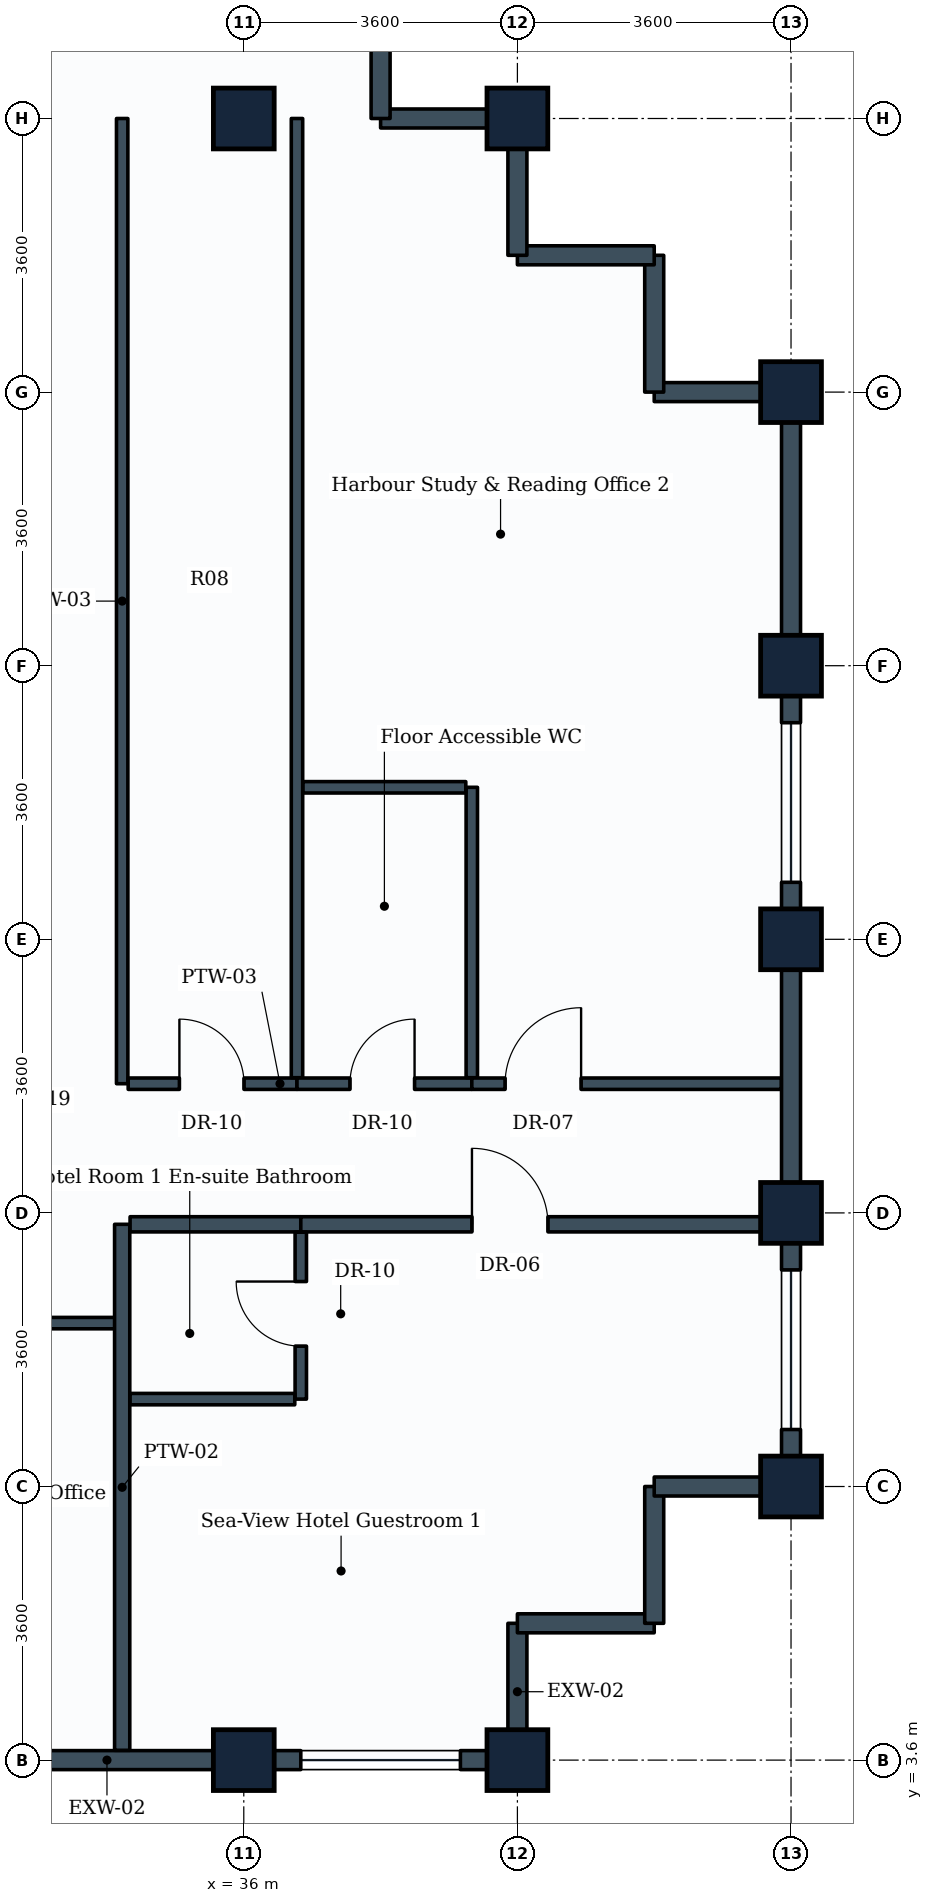
"""IFC4 building model, lengths in metres.
Left out: names, types, materials, properties, quantities, classifications, styles, units other than length and angle.
Written with IfcOpenShell. Run it as: python <this file> out.ifc"""

import sys

from ifc_helpers import new_model, si_unit, direction, frame, frame_2d, origin, origin_2d, place, context, subcontext, project, spatial, rectangle, extrude, element, fill, save


model = new_model("IFC4")
c1 = context("Model", 3, precision=1e-05, world=origin(), true_north=direction((0.0, 1.0)))
c2 = subcontext(c1, "Body", "Model", "MODEL_VIEW")
j1 = project(units=[si_unit("LENGTHUNIT", "METRE"), si_unit("PLANEANGLEUNIT", "RADIAN")], contexts=[c1])
p1 = place(None, origin())
s1 = spatial("IfcSite", under=j1, at=p1, CompositionType="ELEMENT")
p2 = place(p1, origin())
s2 = spatial("IfcBuilding", under=s1, at=p2, CompositionType="ELEMENT")
p3 = place(p2, frame((0.0, 0.0, 284.6)))
s3 = spatial("IfcBuildingStorey", under=s2, at=p3, CompositionType="ELEMENT", Elevation=284.6)
for number, where, z_axis, x_axis in (
    (1, (36.0, 3.6, 0.0), (0.0, 0.0, 1.0), (1.0, 0.0, 0.0)),
    (2, (36.0, 25.2, 0.0), (0.0, 0.0, 1.0), (1.0, 0.0, 0.0)),
    (3, (39.6, 3.6, 0.0), (0.0, 0.0, 1.0), (1.0, 0.0, 0.0)),
    (4, (39.6, 25.2, 0.0), (0.0, 0.0, 1.0), (1.0, 0.0, 0.0)),
    (5, (43.2, 7.2, 0.0), (0.0, 0.0, 1.0), (1.0, 0.0, 0.0)),
    (6, (43.2, 10.8, 0.0), (0.0, 0.0, 1.0), (0.0, 1.0, 0.0)),
    (7, (43.2, 14.4, 0.0), (0.0, 0.0, 1.0), (0.0, 1.0, 0.0)),
    (8, (43.2, 18.0, 0.0), (0.0, 0.0, 1.0), (0.0, 1.0, 0.0)),
    (9, (43.2, 21.6, 0.0), (0.0, 0.0, 1.0), (0.0, 1.0, 0.0)),
):
    element("IfcColumn", number, at=place(p3, frame(where, z_axis=z_axis, x_axis=x_axis)), inside=s3, PredefinedType="COLUMN", context=c2, shape_type="SweptSolid", body=[
        extrude(rectangle(XDim=0.8, YDim=0.8, at=origin_2d()), origin(), (0.0, 0.0, 1.0), 3.6),
    ])
p4 = place(p3, frame((36.0, 3.6, 0.0), z_axis=(0.0, 0.0, 1.0), x_axis=(-1.0, 0.0, 0.0)))
e10 = element("IfcWall", 10, at=p4, inside=s3, PredefinedType="STANDARD", context=c2, shape_type="SweptSolid", body=[
    extrude(rectangle(XDim=3.6, YDim=0.25, at=frame_2d((1.8, 0.0))), origin(), (0.0, 0.0, 1.0), 2.83),
])
p5 = place(p3, frame((39.6, 3.6, 0.0), z_axis=(0.0, 0.0, 1.0), x_axis=(-1.0, 0.0, 0.0)))
e11 = element("IfcWall", 11, at=p5, inside=s3, PredefinedType="STANDARD", context=c2, shape_type="SweptSolid", body=[
    extrude(rectangle(XDim=3.6, YDim=0.25, at=frame_2d((1.8, 0.0))), origin(), (0.0, 0.0, 1.0), 2.83),
])
p6 = place(p5, frame((0.75, 0.0, 0.85)))
e12 = element("IfcOpeningElement", 12, at=p6, cuts=e11, PredefinedType="OPENING", context=c2, shape_type="SweptSolid", body=[
    extrude(rectangle(XDim=2.1, YDim=1.35, at=frame_2d((1.05, 0.675))), frame((0.0, 0.135, 0.0), z_axis=(0.0, -1.0, 0.0), x_axis=(1.0, 0.0, 0.0)), (0.0, 0.0, 1.0), 0.27),
])
p7 = place(p3, frame((39.6, 5.4, 0.0), z_axis=(0.0, 0.0, 1.0), x_axis=(0.0, -1.0, 0.0)))
e13 = element("IfcWall", 13, at=p7, inside=s3, PredefinedType="STANDARD", context=c2, shape_type="SweptSolid", body=[
    extrude(rectangle(XDim=1.8, YDim=0.25, at=frame_2d((0.9, 0.0))), origin(), (0.0, 0.0, 1.0), 2.83),
])
p8 = place(p3, frame((41.4, 5.4, 0.0), z_axis=(0.0, 0.0, 1.0), x_axis=(-1.0, 0.0, 0.0)))
e14 = element("IfcWall", 14, at=p8, inside=s3, PredefinedType="STANDARD", context=c2, shape_type="SweptSolid", body=[
    extrude(rectangle(XDim=1.8, YDim=0.25, at=frame_2d((0.9, 0.0))), origin(), (0.0, 0.0, 1.0), 3.335),
])
p9 = place(p3, frame((41.4, 7.2, 0.0), z_axis=(0.0, 0.0, 1.0), x_axis=(0.0, -1.0, 0.0)))
e15 = element("IfcWall", 15, at=p9, inside=s3, PredefinedType="STANDARD", context=c2, shape_type="SweptSolid", body=[
    extrude(rectangle(XDim=1.8, YDim=0.25, at=frame_2d((0.9, 0.0))), origin(), (0.0, 0.0, 1.0), 3.335),
])
p10 = place(p3, frame((43.2, 7.2, 0.0), z_axis=(0.0, 0.0, 1.0), x_axis=(-1.0, 0.0, 0.0)))
e16 = element("IfcWall", 16, at=p10, inside=s3, PredefinedType="STANDARD", context=c2, shape_type="SweptSolid", body=[
    extrude(rectangle(XDim=1.8, YDim=0.25, at=frame_2d((0.9, 0.0))), origin(), (0.0, 0.0, 1.0), 2.83),
])
p11 = place(p3, frame((43.2, 10.8, 0.0), z_axis=(0.0, 0.0, 1.0), x_axis=(0.0, -1.0, 0.0)))
e17 = element("IfcWall", 17, at=p11, inside=s3, PredefinedType="STANDARD", context=c2, shape_type="SweptSolid", body=[
    extrude(rectangle(XDim=3.6, YDim=0.25, at=frame_2d((1.8, 0.0))), origin(), (0.0, 0.0, 1.0), 2.83),
])
p12 = place(p11, frame((0.75, 0.0, 0.85)))
e18 = element("IfcOpeningElement", 18, at=p12, cuts=e17, PredefinedType="OPENING", context=c2, shape_type="SweptSolid", body=[
    extrude(rectangle(XDim=2.1, YDim=1.35, at=frame_2d((1.05, 0.675))), frame((0.0, 0.135, 0.0), z_axis=(0.0, -1.0, 0.0), x_axis=(1.0, 0.0, 0.0)), (0.0, 0.0, 1.0), 0.27),
])
p13 = place(p3, frame((43.2, 14.4, 0.0), z_axis=(0.0, 0.0, 1.0), x_axis=(0.0, -1.0, 0.0)))
e19 = element("IfcWall", 19, at=p13, inside=s3, PredefinedType="STANDARD", context=c2, shape_type="SweptSolid", body=[
    extrude(rectangle(XDim=3.6, YDim=0.25, at=frame_2d((1.8, 0.0))), origin(), (0.0, 0.0, 1.0), 2.83),
])
p14 = place(p3, frame((43.2, 18.0, 0.0), z_axis=(0.0, 0.0, 1.0), x_axis=(0.0, -1.0, 0.0)))
e20 = element("IfcWall", 20, at=p14, inside=s3, PredefinedType="STANDARD", context=c2, shape_type="SweptSolid", body=[
    extrude(rectangle(XDim=3.6, YDim=0.25, at=frame_2d((1.8, 0.0))), origin(), (0.0, 0.0, 1.0), 2.83),
])
p15 = place(p14, frame((0.75, 0.0, 0.85)))
e21 = element("IfcOpeningElement", 21, at=p15, cuts=e20, PredefinedType="OPENING", context=c2, shape_type="SweptSolid", body=[
    extrude(rectangle(XDim=2.1, YDim=1.35, at=frame_2d((1.05, 0.675))), frame((0.0, 0.135, 0.0), z_axis=(0.0, -1.0, 0.0), x_axis=(1.0, 0.0, 0.0)), (0.0, 0.0, 1.0), 0.27),
])
p16 = place(p3, frame((43.2, 21.6, 0.0), z_axis=(0.0, 0.0, 1.0), x_axis=(0.0, -1.0, 0.0)))
e22 = element("IfcWall", 22, at=p16, inside=s3, PredefinedType="STANDARD", context=c2, shape_type="SweptSolid", body=[
    extrude(rectangle(XDim=3.6, YDim=0.25, at=frame_2d((1.8, 0.0))), origin(), (0.0, 0.0, 1.0), 2.83),
])
p17 = place(p3, frame((41.4, 21.6, 0.0), z_axis=(0.0, 0.0, 1.0), x_axis=(1.0, 0.0, 0.0)))
e23 = element("IfcWall", 23, at=p17, inside=s3, PredefinedType="STANDARD", context=c2, shape_type="SweptSolid", body=[
    extrude(rectangle(XDim=1.8, YDim=0.25, at=frame_2d((0.9, 0.0))), origin(), (0.0, 0.0, 1.0), 2.83),
])
for number, where, z_axis, x_axis in (
    (24, (41.4, 23.4, 0.0), (0.0, 0.0, 1.0), (0.0, -1.0, 0.0)),
    (25, (39.6, 23.4, 0.0), (0.0, 0.0, 1.0), (1.0, 0.0, 0.0)),
):
    element("IfcWall", number, at=place(p3, frame(where, z_axis=z_axis, x_axis=x_axis)), inside=s3, PredefinedType="STANDARD", context=c2, shape_type="SweptSolid", body=[
        extrude(rectangle(XDim=1.8, YDim=0.25, at=frame_2d((0.9, 0.0))), origin(), (0.0, 0.0, 1.0), 3.335),
    ])
for number, where, z_axis, x_axis in (
    (26, (39.6, 25.2, 0.0), (0.0, 0.0, 1.0), (0.0, -1.0, 0.0)),
    (27, (37.8, 25.2, 0.0), (0.0, 0.0, 1.0), (1.0, 0.0, 0.0)),
):
    element("IfcWall", number, at=place(p3, frame(where, z_axis=z_axis, x_axis=x_axis)), inside=s3, PredefinedType="STANDARD", context=c2, shape_type="SweptSolid", body=[
        extrude(rectangle(XDim=1.8, YDim=0.25, at=frame_2d((0.9, 0.0))), origin(), (0.0, 0.0, 1.0), 2.83),
    ])
p18 = place(p3, frame((37.8, 27.3, 0.0), z_axis=(0.0, 0.0, 1.0), x_axis=(0.0, -1.0, 0.0)))
e28 = element("IfcWall", 28, at=p18, inside=s3, PredefinedType="STANDARD", context=c2, shape_type="SweptSolid", body=[
    extrude(rectangle(XDim=2.1, YDim=0.25, at=frame_2d((1.05, 0.0))), origin(), (0.0, 0.0, 1.0), 2.83),
])
p19 = place(p3, frame((34.4, 12.5, 0.0), z_axis=(0.0, 0.0, 1.0), x_axis=(0.0, 1.0, 0.0)))
e29 = element("IfcWall", 29, at=p19, inside=s3, PredefinedType="PARTITIONING", context=c2, shape_type="SweptSolid", body=[
    extrude(rectangle(XDim=12.7, YDim=0.15, at=frame_2d((6.35, 0.0))), origin(), (0.0, 0.0, 1.0), 2.83),
])
p20 = place(p3, frame((34.479, 12.5, 0.0), z_axis=(0.0, 0.0, 1.0), x_axis=(1.0, 0.0, 0.0)))
e30 = element("IfcWall", 30, at=p20, inside=s3, PredefinedType="PARTITIONING", context=c2, shape_type="SweptSolid", body=[
    extrude(rectangle(XDim=2.221, YDim=0.15, at=frame_2d((1.11, 0.0))), origin(), (0.0, 0.0, 1.0), 3.02),
])
p21 = place(p20, frame((0.674, 0.0, 0.0)))
e31 = element("IfcOpeningElement", 31, at=p21, cuts=e30, PredefinedType="OPENING", context=c2, shape_type="SweptSolid", body=[
    extrude(rectangle(XDim=0.85, YDim=2.1, at=frame_2d((0.425, 1.05))), frame((0.0, 0.085, 0.0), z_axis=(0.0, -1.0, 0.0), x_axis=(1.0, 0.0, 0.0)), (0.0, 0.0, 1.0), 0.17),
])
p22 = place(p3, frame((36.7, 12.579, 0.0), z_axis=(0.0, 0.0, 1.0), x_axis=(0.0, 1.0, 0.0)))
e32 = element("IfcWall", 32, at=p22, inside=s3, PredefinedType="PARTITIONING", context=c2, shape_type="SweptSolid", body=[
    extrude(rectangle(XDim=12.621, YDim=0.15, at=frame_2d((6.311, 0.0))), origin(), (0.0, 0.0, 1.0), 2.83),
])
p23 = place(p3, frame((36.7, 12.5, 0.0), z_axis=(0.0, 0.0, 1.0), x_axis=(1.0, 0.0, 0.0)))
e33 = element("IfcWall", 33, at=p23, inside=s3, PredefinedType="PARTITIONING", context=c2, shape_type="SweptSolid", body=[
    extrude(rectangle(XDim=2.3, YDim=0.15, at=frame_2d((1.15, 0.0))), origin(), (0.0, 0.0, 1.0), 3.335),
])
p24 = place(p23, frame((0.697, 0.0, 0.0)))
e34 = element("IfcOpeningElement", 34, at=p24, cuts=e33, PredefinedType="OPENING", context=c2, shape_type="SweptSolid", body=[
    extrude(rectangle(XDim=0.85, YDim=2.1, at=frame_2d((0.425, 1.05))), frame((0.0, 0.085, 0.0), z_axis=(0.0, -1.0, 0.0), x_axis=(1.0, 0.0, 0.0)), (0.0, 0.0, 1.0), 0.17),
])
p25 = place(p3, frame((39.0, 12.579, 0.0), z_axis=(0.0, 0.0, 1.0), x_axis=(0.0, 1.0, 0.0)))
e35 = element("IfcWall", 35, at=p25, inside=s3, PredefinedType="PARTITIONING", context=c2, shape_type="SweptSolid", body=[
    extrude(rectangle(XDim=3.821, YDim=0.15, at=frame_2d((1.91, 0.0))), origin(), (0.0, 0.0, 1.0), 3.03),
])
p26 = place(p3, frame((36.779, 16.4, 0.0), z_axis=(0.0, 0.0, 1.0), x_axis=(1.0, 0.0, 0.0)))
e36 = element("IfcWall", 36, at=p26, inside=s3, PredefinedType="PARTITIONING", context=c2, shape_type="SweptSolid", body=[
    extrude(rectangle(XDim=2.142, YDim=0.15, at=frame_2d((1.071, 0.0))), origin(), (0.0, 0.0, 1.0), 3.335),
])
p27 = place(p3, frame((28.879, 9.35, 0.0), z_axis=(0.0, 0.0, 1.0), x_axis=(1.0, 0.0, 0.0)))
e37 = element("IfcWall", 37, at=p27, inside=s3, PredefinedType="PARTITIONING", context=c2, shape_type="SweptSolid", body=[
    extrude(rectangle(XDim=5.521, YDim=0.15, at=frame_2d((2.76, 0.0))), origin(), (0.0, 0.0, 1.0), 3.335),
])
p28 = place(p27, frame((0.36, 0.0, 0.0)))
e38 = element("IfcOpeningElement", 38, at=p28, cuts=e37, PredefinedType="OPENING", context=c2, shape_type="SweptSolid", body=[
    extrude(rectangle(XDim=1.0, YDim=2.1, at=frame_2d((0.5, 1.05))), frame((0.0, 0.085, 0.0), z_axis=(0.0, -1.0, 0.0), x_axis=(1.0, 0.0, 0.0)), (0.0, 0.0, 1.0), 0.17),
])
p29 = place(p3, frame((34.4, 3.729, 0.0), z_axis=(0.0, 0.0, 1.0), x_axis=(0.0, 1.0, 0.0)))
e39 = element("IfcWall", 39, at=p29, inside=s3, PredefinedType="PARTITIONING", context=c2, shape_type="SweptSolid", body=[
    extrude(rectangle(XDim=6.921, YDim=0.2, at=frame_2d((3.46, 0.0))), origin(), (0.0, 0.0, 1.0), 2.83),
])
p30 = place(p3, frame((34.504, 10.65, 0.0), z_axis=(0.0, 0.0, 1.0), x_axis=(1.0, 0.0, 0.0)))
e40 = element("IfcWall", 40, at=p30, inside=s3, PredefinedType="PARTITIONING", context=c2, shape_type="SweptSolid", body=[
    extrude(rectangle(XDim=2.246, YDim=0.2, at=frame_2d((1.123, 0.0))), origin(), (0.0, 0.0, 1.0), 3.02),
])
p31 = place(p3, frame((36.75, 10.65, 0.0), z_axis=(0.0, 0.0, 1.0), x_axis=(1.0, 0.0, 0.0)))
e41 = element("IfcWall", 41, at=p31, inside=s3, PredefinedType="PARTITIONING", context=c2, shape_type="SweptSolid", body=[
    extrude(rectangle(XDim=6.321, YDim=0.2, at=frame_2d((3.161, 0.0))), origin(), (0.0, 0.0, 1.0), 2.83),
])
p32 = place(p31, frame((2.252, 0.0, 0.0)))
e42 = element("IfcOpeningElement", 42, at=p32, cuts=e41, PredefinedType="OPENING", context=c2, shape_type="SweptSolid", body=[
    extrude(rectangle(XDim=1.0, YDim=2.1, at=frame_2d((0.5, 1.05))), frame((0.0, 0.11, 0.0), z_axis=(0.0, -1.0, 0.0), x_axis=(1.0, 0.0, 0.0)), (0.0, 0.0, 1.0), 0.22),
])
p33 = place(p3, frame((36.75, 8.35, 0.0), z_axis=(0.0, 0.0, 1.0), x_axis=(0.0, 1.0, 0.0)))
e43 = element("IfcWall", 43, at=p33, inside=s3, PredefinedType="PARTITIONING", context=c2, shape_type="SweptSolid", body=[
    extrude(rectangle(XDim=2.196, YDim=0.15, at=frame_2d((1.098, 0.0))), origin(), (0.0, 0.0, 1.0), 3.335),
])
p34 = place(p33, frame((0.697, 0.0, 0.0)))
e44 = element("IfcOpeningElement", 44, at=p34, cuts=e43, PredefinedType="OPENING", context=c2, shape_type="SweptSolid", body=[
    extrude(rectangle(XDim=0.85, YDim=2.1, at=frame_2d((0.425, 1.05))), frame((0.0, 0.085, 0.0), z_axis=(0.0, -1.0, 0.0), x_axis=(1.0, 0.0, 0.0)), (0.0, 0.0, 1.0), 0.17),
])
p35 = place(p3, frame((34.504, 8.35, 0.0), z_axis=(0.0, 0.0, 1.0), x_axis=(1.0, 0.0, 0.0)))
e45 = element("IfcWall", 45, at=p35, inside=s3, PredefinedType="PARTITIONING", context=c2, shape_type="SweptSolid", body=[
    extrude(rectangle(XDim=2.167, YDim=0.15, at=frame_2d((1.083, 0.0))), origin(), (0.0, 0.0, 1.0), 3.02),
])
p36 = place(p3, frame((39.0, 12.5, 0.0), z_axis=(0.0, 0.0, 1.0), x_axis=(1.0, 0.0, 0.0)))
e46 = element("IfcWall", 46, at=p36, inside=s3, PredefinedType="PARTITIONING", context=c2, shape_type="SweptSolid", body=[
    extrude(rectangle(XDim=4.071, YDim=0.15, at=frame_2d((2.036, 0.0))), origin(), (0.0, 0.0, 1.0), 2.83),
])
p37 = place(p36, frame((0.438, 0.0, 0.0)))
e47 = element("IfcOpeningElement", 47, at=p37, cuts=e46, PredefinedType="OPENING", context=c2, shape_type="SweptSolid", body=[
    extrude(rectangle(XDim=1.0, YDim=2.1, at=frame_2d((0.5, 1.05))), frame((0.0, 0.085, 0.0), z_axis=(0.0, -1.0, 0.0), x_axis=(1.0, 0.0, 0.0)), (0.0, 0.0, 1.0), 0.17),
])
p38 = place(p6, origin())
e48 = element("IfcWindow", 48, at=p38, inside=s3, PartitioningType="SINGLE_PANEL", PredefinedType="WINDOW", context=c2, shape_type="SweptSolid", body=[
    extrude(rectangle(XDim=2.1, YDim=1.35, at=frame_2d((1.05, 0.675))), frame((0.0, 0.03, 0.0), z_axis=(0.0, -1.0, 0.0), x_axis=(1.0, 0.0, 0.0)), (0.0, 0.0, 1.0), 0.06),
])
fill(e12, e48)
p39 = place(p12, origin())
e49 = element("IfcWindow", 49, at=p39, inside=s3, PartitioningType="SINGLE_PANEL", PredefinedType="WINDOW", context=c2, shape_type="SweptSolid", body=[
    extrude(rectangle(XDim=2.1, YDim=1.35, at=frame_2d((1.05, 0.675))), frame((0.0, 0.03, 0.0), z_axis=(0.0, -1.0, 0.0), x_axis=(1.0, 0.0, 0.0)), (0.0, 0.0, 1.0), 0.06),
])
fill(e18, e49)
p40 = place(p15, origin())
e50 = element("IfcWindow", 50, at=p40, inside=s3, PartitioningType="SINGLE_PANEL", PredefinedType="WINDOW", context=c2, shape_type="SweptSolid", body=[
    extrude(rectangle(XDim=2.1, YDim=1.35, at=frame_2d((1.05, 0.675))), frame((0.0, 0.03, 0.0), z_axis=(0.0, -1.0, 0.0), x_axis=(1.0, 0.0, 0.0)), (0.0, 0.0, 1.0), 0.06),
])
fill(e21, e50)
p41 = place(p21, origin())
e51 = element("IfcDoor", 51, at=p41, inside=s3, OperationType="SINGLE_SWING_LEFT", PredefinedType="DOOR", context=c2, shape_type="SweptSolid", body=[
    extrude(rectangle(XDim=0.85, YDim=2.1, at=frame_2d((0.425, 1.05))), frame((0.0, 0.025, 0.0), z_axis=(0.0, -1.0, 0.0), x_axis=(1.0, 0.0, 0.0)), (0.0, 0.0, 1.0), 0.05),
])
fill(e31, e51)
p42 = place(p24, origin())
e52 = element("IfcDoor", 52, at=p42, inside=s3, OperationType="SINGLE_SWING_RIGHT", PredefinedType="DOOR", context=c2, shape_type="SweptSolid", body=[
    extrude(rectangle(XDim=0.85, YDim=2.1, at=frame_2d((0.425, 1.05))), frame((0.0, 0.025, 0.0), z_axis=(0.0, -1.0, 0.0), x_axis=(1.0, 0.0, 0.0)), (0.0, 0.0, 1.0), 0.05),
])
fill(e34, e52)
p43 = place(p32, origin())
e53 = element("IfcDoor", 53, at=p43, inside=s3, OperationType="SINGLE_SWING_LEFT", PredefinedType="DOOR", context=c2, shape_type="SweptSolid", body=[
    extrude(rectangle(XDim=1.0, YDim=2.1, at=frame_2d((0.5, 1.05))), frame((0.0, 0.025, 0.0), z_axis=(0.0, -1.0, 0.0), x_axis=(1.0, 0.0, 0.0)), (0.0, 0.0, 1.0), 0.05),
])
fill(e42, e53)
p44 = place(p34, origin())
e54 = element("IfcDoor", 54, at=p44, inside=s3, OperationType="SINGLE_SWING_RIGHT", PredefinedType="DOOR", context=c2, shape_type="SweptSolid", body=[
    extrude(rectangle(XDim=0.85, YDim=2.1, at=frame_2d((0.425, 1.05))), frame((0.0, 0.025, 0.0), z_axis=(0.0, -1.0, 0.0), x_axis=(1.0, 0.0, 0.0)), (0.0, 0.0, 1.0), 0.05),
])
fill(e44, e54)
p45 = place(p37, origin())
e55 = element("IfcDoor", 55, at=p45, inside=s3, OperationType="SINGLE_SWING_RIGHT", PredefinedType="DOOR", context=c2, shape_type="SweptSolid", body=[
    extrude(rectangle(XDim=1.0, YDim=2.1, at=frame_2d((0.5, 1.05))), frame((0.0, 0.025, 0.0), z_axis=(0.0, -1.0, 0.0), x_axis=(1.0, 0.0, 0.0)), (0.0, 0.0, 1.0), 0.05),
])
fill(e47, e55)
save(model, sys.argv[1])
